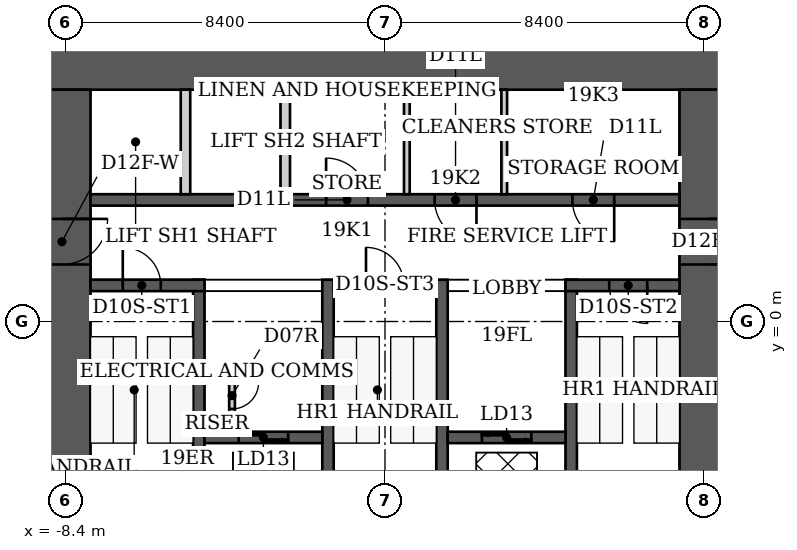
"""IFC4 building model, lengths in metres.
Left out: names, types, materials, properties, quantities, classifications, styles, units other than length and angle.
Written with IfcOpenShell. Run it as: python <this file> out.ifc"""

import sys

from ifc_helpers import new_model, si_unit, direction, frame, frame_2d, origin, place, context, subcontext, project, spatial, rectangle, extrude, element, fill, save


model = new_model("IFC4")
c1 = context("Model", 3, precision=1e-05, world=origin(), true_north=direction((0.0, 1.0)))
c2 = subcontext(c1, "Body", "Model", "MODEL_VIEW")
j1 = project(units=[si_unit("LENGTHUNIT", "METRE"), si_unit("PLANEANGLEUNIT", "RADIAN")], contexts=[c1])
p1 = place(None, origin())
s1 = spatial("IfcSite", under=j1, at=p1, CompositionType="ELEMENT")
p2 = place(p1, origin())
s2 = spatial("IfcBuilding", under=s1, at=p2, CompositionType="ELEMENT")
p3 = place(p2, frame((0.0, 0.0, 80.0)))
s3 = spatial("IfcBuildingStorey", under=s2, at=p3, CompositionType="ELEMENT", Elevation=80.0)
p4 = place(p3, frame((-9.25, 6.85, 0.0), z_axis=(0.0, 0.0, 1.0), x_axis=(1.0, 0.0, 0.0)))
e1 = element("IfcWall", 1, at=p4, inside=s3, PredefinedType="SHEAR", context=c2, shape_type="SweptSolid", body=[
    extrude(rectangle(XDim=18.5, YDim=1.5, at=frame_2d((9.25, 0.0))), origin(), (0.0, 0.0, 1.0), 3.8),
])
p5 = place(p3, frame((-8.5, -9.2, 0.0), z_axis=(0.0, 0.0, 1.0), x_axis=(0.0, 1.0, 0.0)))
e2 = element("IfcWall", 2, at=p5, inside=s3, PredefinedType="SHEAR", context=c2, shape_type="SweptSolid", body=[
    extrude(rectangle(XDim=15.3, YDim=1.5, at=frame_2d((7.65, 0.0))), origin(), (0.0, 0.0, 1.0), 3.8),
])
p6 = place(p5, frame((10.7, 0.0, 0.0)))
e3 = element("IfcOpeningElement", 3, at=p6, cuts=e2, PredefinedType="OPENING", context=c2, shape_type="SweptSolid", body=[
    extrude(rectangle(XDim=1.2, YDim=2.2, at=frame_2d((0.6, 1.1))), frame((0.0, 0.75, 0.0), z_axis=(0.0, -1.0, 0.0), x_axis=(1.0, 0.0, 0.0)), (0.0, 0.0, 1.0), 1.5),
])
p7 = place(p3, frame((8.5, -9.2, 0.0), z_axis=(0.0, 0.0, 1.0), x_axis=(0.0, 1.0, 0.0)))
e4 = element("IfcWall", 4, at=p7, inside=s3, PredefinedType="SHEAR", context=c2, shape_type="SweptSolid", body=[
    extrude(rectangle(XDim=15.3, YDim=1.5, at=frame_2d((7.65, 0.0))), origin(), (0.0, 0.0, 1.0), 3.8),
])
p8 = place(p7, frame((10.7, 0.0, 0.0)))
e5 = element("IfcOpeningElement", 5, at=p8, cuts=e4, PredefinedType="OPENING", context=c2, shape_type="SweptSolid", body=[
    extrude(rectangle(XDim=1.2, YDim=2.2, at=frame_2d((0.6, 1.1))), frame((0.0, 0.75, 0.0), z_axis=(0.0, -1.0, 0.0), x_axis=(1.0, 0.0, 0.0)), (0.0, 0.0, 1.0), 1.5),
])
for number, where, z_axis, x_axis in (
    (6, (-4.9, -6.1, 0.0), (0.0, 0.0, 1.0), (0.0, 1.0, 0.0)),
    (7, (-1.5, -6.1, 0.0), (0.0, 0.0, 1.0), (0.0, 1.0, 0.0)),
    (8, (1.5, -6.1, 0.0), (0.0, 0.0, 1.0), (0.0, 1.0, 0.0)),
    (9, (4.9, -6.1, 0.0), (0.0, 0.0, 1.0), (0.0, 1.0, 0.0)),
):
    element("IfcWall", number, at=place(p3, frame(where, z_axis=z_axis, x_axis=x_axis)), inside=s3, PredefinedType="SHEAR", context=c2, shape_type="SweptSolid", body=[
        extrude(rectangle(XDim=7.2, YDim=0.3, at=frame_2d((3.6, 0.0))), origin(), (0.0, 0.0, 1.0), 3.8),
    ])
p9 = place(p3, frame((-7.75, 0.95, 0.0), z_axis=(0.0, 0.0, 1.0), x_axis=(1.0, 0.0, 0.0)))
e10 = element("IfcWall", 10, at=p9, inside=s3, PredefinedType="SHEAR", context=c2, shape_type="SweptSolid", body=[
    extrude(rectangle(XDim=3.0, YDim=0.3, at=frame_2d((1.5, 0.0))), origin(), (0.0, 0.0, 1.0), 3.8),
])
p10 = place(p9, frame((0.85, 0.0, 0.0)))
e11 = element("IfcOpeningElement", 11, at=p10, cuts=e10, PredefinedType="OPENING", context=c2, shape_type="SweptSolid", body=[
    extrude(rectangle(XDim=1.0, YDim=2.2, at=frame_2d((0.5, 1.1))), frame((0.0, 0.15, 0.0), z_axis=(0.0, -1.0, 0.0), x_axis=(1.0, 0.0, 0.0)), (0.0, 0.0, 1.0), 0.3),
])
p11 = place(p3, frame((-1.35, 0.95, 0.0), z_axis=(0.0, 0.0, 1.0), x_axis=(1.0, 0.0, 0.0)))
e12 = element("IfcWall", 12, at=p11, inside=s3, PredefinedType="SHEAR", context=c2, shape_type="SweptSolid", body=[
    extrude(rectangle(XDim=2.7, YDim=0.3, at=frame_2d((1.35, 0.0))), origin(), (0.0, 0.0, 1.0), 3.8),
])
p12 = place(p11, frame((0.85, 0.0, 0.0)))
e13 = element("IfcOpeningElement", 13, at=p12, cuts=e12, PredefinedType="OPENING", context=c2, shape_type="SweptSolid", body=[
    extrude(rectangle(XDim=1.0, YDim=2.2, at=frame_2d((0.5, 1.1))), frame((0.0, 0.15, 0.0), z_axis=(0.0, -1.0, 0.0), x_axis=(1.0, 0.0, 0.0)), (0.0, 0.0, 1.0), 0.3),
])
p13 = place(p3, frame((4.75, 0.95, 0.0), z_axis=(0.0, 0.0, 1.0), x_axis=(1.0, 0.0, 0.0)))
e14 = element("IfcWall", 14, at=p13, inside=s3, PredefinedType="SHEAR", context=c2, shape_type="SweptSolid", body=[
    extrude(rectangle(XDim=3.0, YDim=0.3, at=frame_2d((1.5, 0.0))), origin(), (0.0, 0.0, 1.0), 3.8),
])
p14 = place(p13, frame((1.15, 0.0, 0.0)))
e15 = element("IfcOpeningElement", 15, at=p14, cuts=e14, PredefinedType="OPENING", context=c2, shape_type="SweptSolid", body=[
    extrude(rectangle(XDim=1.0, YDim=2.2, at=frame_2d((0.5, 1.1))), frame((0.0, 0.15, 0.0), z_axis=(0.0, -1.0, 0.0), x_axis=(1.0, 0.0, 0.0)), (0.0, 0.0, 1.0), 0.3),
])
p15 = place(p3, frame((-4.75, -3.05, 0.0), z_axis=(0.0, 0.0, 1.0), x_axis=(1.0, 0.0, 0.0)))
e16 = element("IfcWall", 16, at=p15, inside=s3, PredefinedType="SHEAR", context=c2, shape_type="SweptSolid", body=[
    extrude(rectangle(XDim=3.1, YDim=0.3, at=frame_2d((1.55, 0.0))), origin(), (0.0, 0.0, 1.0), 3.8),
])
p16 = place(p15, frame((0.9, 0.0, 0.0)))
e17 = element("IfcOpeningElement", 17, at=p16, cuts=e16, PredefinedType="OPENING", context=c2, shape_type="SweptSolid", body=[
    extrude(rectangle(XDim=1.3, YDim=2.1, at=frame_2d((0.65, 1.05))), frame((0.0, 0.15, 0.0), z_axis=(0.0, -1.0, 0.0), x_axis=(1.0, 0.0, 0.0)), (0.0, 0.0, 1.0), 0.3),
])
p17 = place(p3, frame((1.65, -3.05, 0.0), z_axis=(0.0, 0.0, 1.0), x_axis=(1.0, 0.0, 0.0)))
e18 = element("IfcWall", 18, at=p17, inside=s3, PredefinedType="SHEAR", context=c2, shape_type="SweptSolid", body=[
    extrude(rectangle(XDim=3.1, YDim=0.3, at=frame_2d((1.55, 0.0))), origin(), (0.0, 0.0, 1.0), 3.8),
])
p18 = place(p17, frame((0.9, 0.0, 0.0)))
e19 = element("IfcOpeningElement", 19, at=p18, cuts=e18, PredefinedType="OPENING", context=c2, shape_type="SweptSolid", body=[
    extrude(rectangle(XDim=1.3, YDim=2.1, at=frame_2d((0.65, 1.05))), frame((0.0, 0.15, 0.0), z_axis=(0.0, -1.0, 0.0), x_axis=(1.0, 0.0, 0.0)), (0.0, 0.0, 1.0), 0.3),
])
p19 = place(p3, frame((-7.75, 3.2, 0.0), z_axis=(0.0, 0.0, 1.0), x_axis=(1.0, 0.0, 0.0)))
e20 = element("IfcWall", 20, at=p19, inside=s3, PredefinedType="SHEAR", context=c2, shape_type="SweptSolid", body=[
    extrude(rectangle(XDim=15.5, YDim=0.3, at=frame_2d((7.75, 0.0))), origin(), (0.0, 0.0, 1.0), 3.8),
])
p20 = place(p19, frame((6.2, 0.0, 0.0)))
e21 = element("IfcOpeningElement", 21, at=p20, cuts=e20, PredefinedType="OPENING", context=c2, shape_type="SweptSolid", body=[
    extrude(rectangle(XDim=1.1, YDim=2.2, at=frame_2d((0.55, 1.1))), frame((0.0, 0.15, 0.0), z_axis=(0.0, -1.0, 0.0), x_axis=(1.0, 0.0, 0.0)), (0.0, 0.0, 1.0), 0.3),
])
p21 = place(p19, frame((9.056, 0.0, 0.0)))
e22 = element("IfcOpeningElement", 22, at=p21, cuts=e20, PredefinedType="OPENING", context=c2, shape_type="SweptSolid", body=[
    extrude(rectangle(XDim=1.1, YDim=2.2, at=frame_2d((0.55, 1.1))), frame((0.0, 0.15, 0.0), z_axis=(0.0, -1.0, 0.0), x_axis=(1.0, 0.0, 0.0)), (0.0, 0.0, 1.0), 0.3),
])
p22 = place(p19, frame((12.681, 0.0, 0.0)))
e23 = element("IfcOpeningElement", 23, at=p22, cuts=e20, PredefinedType="OPENING", context=c2, shape_type="SweptSolid", body=[
    extrude(rectangle(XDim=1.1, YDim=2.2, at=frame_2d((0.55, 1.1))), frame((0.0, 0.15, 0.0), z_axis=(0.0, -1.0, 0.0), x_axis=(1.0, 0.0, 0.0)), (0.0, 0.0, 1.0), 0.3),
])
for number, where, z_axis, x_axis in (
    (24, (-5.25, 3.35, 0.0), (0.0, 0.0, 1.0), (0.0, 1.0, 0.0)),
    (25, (-2.625, 3.35, 0.0), (0.0, 0.0, 1.0), (0.0, 1.0, 0.0)),
):
    element("IfcWall", number, at=place(p3, frame(where, z_axis=z_axis, x_axis=x_axis)), inside=s3, PredefinedType="PARTITIONING", context=c2, shape_type="SweptSolid", body=[
        extrude(rectangle(XDim=2.75, YDim=0.25, at=frame_2d((1.375, 0.0))), origin(), (0.0, 0.0, 1.0), 3.8),
    ])
p23 = place(p3, frame((-4.025, -2.9, 0.0), z_axis=(0.0, 0.0, 1.0), x_axis=(0.0, 1.0, 0.0)))
e26 = element("IfcWall", 26, at=p23, inside=s3, PredefinedType="PARTITIONING", context=c2, shape_type="SweptSolid", body=[
    extrude(rectangle(XDim=1.775, YDim=0.15, at=frame_2d((0.887, 0.0))), origin(), (0.0, 0.0, 1.0), 3.64),
])
p24 = place(p23, frame((0.6, 0.0, 0.0)))
e27 = element("IfcOpeningElement", 27, at=p24, cuts=e26, PredefinedType="OPENING", context=c2, shape_type="SweptSolid", body=[
    extrude(rectangle(XDim=0.7, YDim=2.1, at=frame_2d((0.35, 1.05))), frame((0.0, 0.075, 0.0), z_axis=(0.0, -1.0, 0.0), x_axis=(1.0, 0.0, 0.0)), (0.0, 0.0, 1.0), 0.15),
])
p25 = place(p3, frame((-4.75, -1.2, 0.0), z_axis=(0.0, 0.0, 1.0), x_axis=(1.0, 0.0, 0.0)))
e28 = element("IfcWall", 28, at=p25, inside=s3, PredefinedType="PARTITIONING", context=c2, shape_type="SweptSolid", body=[
    extrude(rectangle(XDim=0.8, YDim=0.15, at=frame_2d((0.4, 0.0))), origin(), (0.0, 0.0, 1.0), 3.64),
])
for number, where, z_axis, x_axis in (
    (29, (0.575, 3.35, 0.0), (0.0, 0.0, 1.0), (0.0, 1.0, 0.0)),
    (30, (3.137, 3.35, 0.0), (0.0, 0.0, 1.0), (0.0, 1.0, 0.0)),
):
    element("IfcWall", number, at=place(p3, frame(where, z_axis=z_axis, x_axis=x_axis)), inside=s3, PredefinedType="PARTITIONING", context=c2, shape_type="SweptSolid", body=[
        extrude(rectangle(XDim=2.75, YDim=0.15, at=frame_2d((1.375, 0.0))), origin(), (0.0, 0.0, 1.0), 3.64),
    ])
p26 = place(p10, origin())
e31 = element("IfcDoor", 31, at=p26, inside=s3, OperationType="SINGLE_SWING_LEFT", PredefinedType="DOOR", context=c2, shape_type="SweptSolid", body=[
    extrude(rectangle(XDim=1.0, YDim=2.2, at=frame_2d((0.5, 1.1))), frame((0.0, 0.025, 0.0), z_axis=(0.0, -1.0, 0.0), x_axis=(1.0, 0.0, 0.0)), (0.0, 0.0, 1.0), 0.05),
])
fill(e11, e31)
p27 = place(p12, origin())
e32 = element("IfcDoor", 32, at=p27, inside=s3, OperationType="SINGLE_SWING_LEFT", PredefinedType="DOOR", context=c2, shape_type="SweptSolid", body=[
    extrude(rectangle(XDim=1.0, YDim=2.2, at=frame_2d((0.5, 1.1))), frame((0.0, 0.025, 0.0), z_axis=(0.0, -1.0, 0.0), x_axis=(1.0, 0.0, 0.0)), (0.0, 0.0, 1.0), 0.05),
])
fill(e13, e32)
p28 = place(p14, origin())
e33 = element("IfcDoor", 33, at=p28, inside=s3, OperationType="SINGLE_SWING_RIGHT", PredefinedType="DOOR", context=c2, shape_type="SweptSolid", body=[
    extrude(rectangle(XDim=1.0, YDim=2.2, at=frame_2d((0.5, 1.1))), frame((0.0, 0.025, 0.0), z_axis=(0.0, -1.0, 0.0), x_axis=(1.0, 0.0, 0.0)), (0.0, 0.0, 1.0), 0.05),
])
fill(e15, e33)
p29 = place(p6, origin())
e34 = element("IfcDoor", 34, at=p29, inside=s3, OperationType="SINGLE_SWING_RIGHT", PredefinedType="DOOR", context=c2, shape_type="SweptSolid", body=[
    extrude(rectangle(XDim=1.2, YDim=2.2, at=frame_2d((0.6, 1.1))), frame((0.0, 0.025, 0.0), z_axis=(0.0, -1.0, 0.0), x_axis=(1.0, 0.0, 0.0)), (0.0, 0.0, 1.0), 0.05),
])
fill(e3, e34)
p30 = place(p8, origin())
e35 = element("IfcDoor", 35, at=p30, inside=s3, OperationType="SINGLE_SWING_RIGHT", PredefinedType="DOOR", context=c2, shape_type="SweptSolid", body=[
    extrude(rectangle(XDim=1.2, YDim=2.2, at=frame_2d((0.6, 1.1))), frame((0.0, 0.025, 0.0), z_axis=(0.0, -1.0, 0.0), x_axis=(1.0, 0.0, 0.0)), (0.0, 0.0, 1.0), 0.05),
])
fill(e5, e35)
p31 = place(p24, origin())
e36 = element("IfcDoor", 36, at=p31, inside=s3, OperationType="SINGLE_SWING_RIGHT", PredefinedType="DOOR", context=c2, shape_type="SweptSolid", body=[
    extrude(rectangle(XDim=0.7, YDim=2.1, at=frame_2d((0.35, 1.05))), frame((0.0, 0.025, 0.0), z_axis=(0.0, -1.0, 0.0), x_axis=(1.0, 0.0, 0.0)), (0.0, 0.0, 1.0), 0.05),
])
fill(e27, e36)
p32 = place(p20, origin())
e37 = element("IfcDoor", 37, at=p32, inside=s3, OperationType="SINGLE_SWING_LEFT", PredefinedType="DOOR", context=c2, shape_type="SweptSolid", body=[
    extrude(rectangle(XDim=1.1, YDim=2.2, at=frame_2d((0.55, 1.1))), frame((0.0, 0.025, 0.0), z_axis=(0.0, -1.0, 0.0), x_axis=(1.0, 0.0, 0.0)), (0.0, 0.0, 1.0), 0.05),
])
fill(e21, e37)
p33 = place(p21, origin())
e38 = element("IfcDoor", 38, at=p33, inside=s3, OperationType="SINGLE_SWING_RIGHT", PredefinedType="DOOR", context=c2, shape_type="SweptSolid", body=[
    extrude(rectangle(XDim=1.1, YDim=2.2, at=frame_2d((0.55, 1.1))), frame((0.0, 0.025, 0.0), z_axis=(0.0, -1.0, 0.0), x_axis=(1.0, 0.0, 0.0)), (0.0, 0.0, 1.0), 0.05),
])
fill(e22, e38)
p34 = place(p22, origin())
e39 = element("IfcDoor", 39, at=p34, inside=s3, OperationType="SINGLE_SWING_RIGHT", PredefinedType="DOOR", context=c2, shape_type="SweptSolid", body=[
    extrude(rectangle(XDim=1.1, YDim=2.2, at=frame_2d((0.55, 1.1))), frame((0.0, 0.025, 0.0), z_axis=(0.0, -1.0, 0.0), x_axis=(1.0, 0.0, 0.0)), (0.0, 0.0, 1.0), 0.05),
])
fill(e23, e39)
p35 = place(p16, origin())
e40 = element("IfcDoor", 40, at=p35, inside=s3, OperationType="DOUBLE_DOOR_SLIDING", PredefinedType="DOOR", context=c2, shape_type="SweptSolid", body=[
    extrude(rectangle(XDim=1.3, YDim=2.1, at=frame_2d((0.65, 1.05))), frame((0.0, 0.025, 0.0), z_axis=(0.0, -1.0, 0.0), x_axis=(1.0, 0.0, 0.0)), (0.0, 0.0, 1.0), 0.05),
])
fill(e17, e40)
p36 = place(p18, origin())
e41 = element("IfcDoor", 41, at=p36, inside=s3, OperationType="DOUBLE_DOOR_SLIDING", PredefinedType="DOOR", context=c2, shape_type="SweptSolid", body=[
    extrude(rectangle(XDim=1.3, YDim=2.1, at=frame_2d((0.65, 1.05))), frame((0.0, 0.025, 0.0), z_axis=(0.0, -1.0, 0.0), x_axis=(1.0, 0.0, 0.0)), (0.0, 0.0, 1.0), 0.05),
])
fill(e19, e41)
save(model, sys.argv[1])
